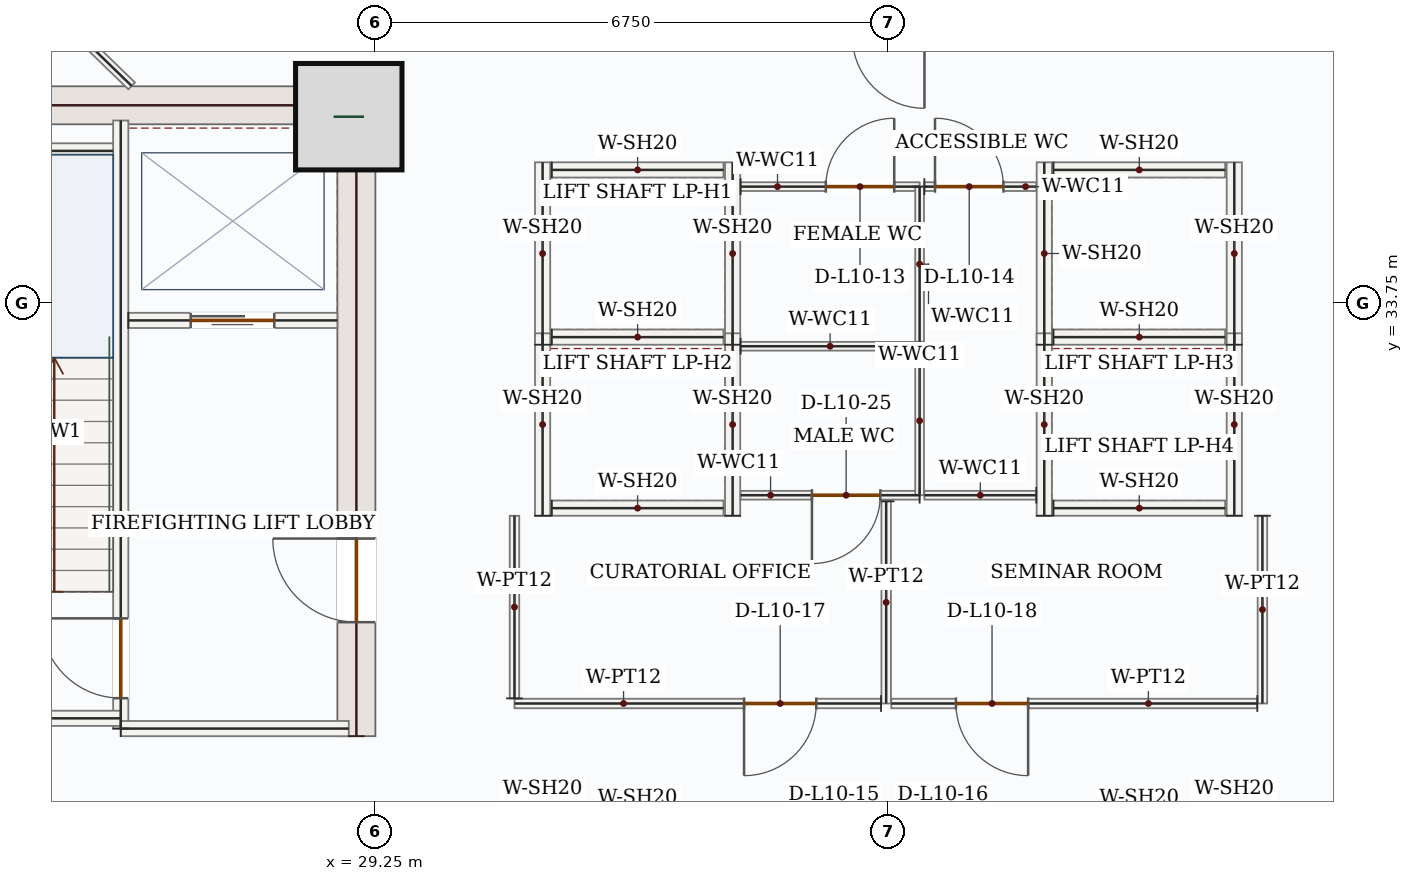
"""IFC4 building model, lengths in metres.
Left out: names, types, materials, properties, quantities, classifications, styles, units other than length and angle.
Written with IfcOpenShell. Run it as: python <this file> out.ifc"""

import sys

from ifc_helpers import new_model, si_unit, direction, frame, frame_2d, origin, origin_2d, place, context, subcontext, project, spatial, rectangle, extrude, source, transform, mapped, element, fill, save


model = new_model("IFC4")
c1 = context("Model", 3, precision=1e-05, world=origin(), true_north=direction((0.0, 1.0)))
c2 = subcontext(c1, "Body", "Model", "MODEL_VIEW")
j1 = project(units=[si_unit("LENGTHUNIT", "METRE"), si_unit("PLANEANGLEUNIT", "RADIAN")], contexts=[c1])
p1 = place(None, origin())
s1 = spatial("IfcSite", under=j1, at=p1, CompositionType="ELEMENT")
p2 = place(p1, origin())
s2 = spatial("IfcBuilding", under=s1, at=p2, CompositionType="ELEMENT")
p3 = place(p2, frame((0.0, 0.0, 50.1)))
s3 = spatial("IfcBuildingStorey", under=s2, at=p3, CompositionType="ELEMENT", Elevation=50.1)
p4 = place(p3, frame((29.0, 28.05, 0.0), z_axis=(0.0, 0.0, 1.0), x_axis=(0.0, 1.0, 0.0)))
e1 = element("IfcWall", 1, at=p4, inside=s3, PredefinedType="SHEAR", context=c2, shape_type="SweptSolid", body=[
    extrude(rectangle(XDim=8.55, YDim=0.5, at=frame_2d((4.275, 0.0))), origin(), (0.0, 0.0, 1.0), 3.95),
])
p5 = place(p4, frame((1.5, 0.0, 0.0)))
e2 = element("IfcOpeningElement", 2, at=p5, cuts=e1, PredefinedType="OPENING", context=c2, shape_type="SweptSolid", body=[
    extrude(rectangle(XDim=1.1, YDim=2.2, at=frame_2d((0.55, 1.1))), frame((0.0, 0.26, 0.0), z_axis=(0.0, -1.0, 0.0), x_axis=(1.0, 0.0, 0.0)), (0.0, 0.0, 1.0), 0.52),
])
m1 = source(origin(), c2, "Body", "SweptSolid", [
    extrude(rectangle(XDim=7.0, YDim=0.5, at=frame_2d((3.5, 0.0))), origin(), (0.0, 0.0, 1.0), 3.95),
])
p6 = place(p3, frame((21.75, 36.35, 0.0), z_axis=(0.0, 0.0, 1.0), x_axis=(1.0, 0.0, 0.0)))
e3 = element("IfcWall", 3, at=p6, inside=s3, PredefinedType="SHEAR", context=c2, shape_type="MappedRepresentation", body=[
    mapped(m1, transform((0.0, 0.0, 0.0), x_axis=(1.0, 0.0, 0.0), y_axis=(0.0, 1.0, 0.0), z_axis=(0.0, 0.0, 1.0), scale=1.0)),
])
m2 = source(origin(), c2, "Body", "SweptSolid", [
    extrude(rectangle(XDim=1.4, YDim=1.4, at=origin_2d()), origin(), (0.0, 0.0, 1.0), 4.2),
])
p7 = place(p3, frame((28.9, 36.2, 0.0), z_axis=(0.0, 0.0, 1.0), x_axis=(1.0, 0.0, 0.0)))
e4 = element("IfcColumn", 4, at=p7, inside=s3, PredefinedType="COLUMN", context=c2, shape_type="MappedRepresentation", body=[
    mapped(m2, transform((0.0, 0.0, 0.0), x_axis=(1.0, 0.0, 0.0), y_axis=(0.0, 1.0, 0.0), z_axis=(0.0, 0.0, 1.0), scale=1.0)),
])
p8 = place(p3, frame((25.9, 28.15, 0.0), z_axis=(0.0, 0.0, 1.0), x_axis=(0.0, 1.0, 0.0)))
e5 = element("IfcWall", 5, at=p8, inside=s3, PredefinedType="SOLIDWALL", context=c2, shape_type="SweptSolid", body=[
    extrude(rectangle(XDim=8.0, YDim=0.2, at=frame_2d((4.0, 0.0))), origin(), (0.0, 0.0, 1.0), 3.95),
])
p9 = place(p8, frame((0.4, 0.0, 0.0)))
e6 = element("IfcOpeningElement", 6, at=p9, cuts=e5, PredefinedType="OPENING", context=c2, shape_type="SweptSolid", body=[
    extrude(rectangle(XDim=1.05, YDim=2.15, at=frame_2d((0.525, 1.075))), frame((0.0, 0.11, 0.0), z_axis=(0.0, -1.0, 0.0), x_axis=(1.0, 0.0, 0.0)), (0.0, 0.0, 1.0), 0.22),
])
m3 = source(origin(), c2, "Body", "SweptSolid", [
    extrude(rectangle(XDim=4.25, YDim=0.2, at=frame_2d((2.125, 0.0))), origin(), (0.0, 0.0, 1.0), 3.95),
])
p10 = place(p3, frame((21.65, 28.285, 0.0), z_axis=(0.0, 0.0, 1.0), x_axis=(1.0, 0.0, 0.0)))
e7 = element("IfcWall", 7, at=p10, inside=s3, PredefinedType="SOLIDWALL", context=c2, shape_type="MappedRepresentation", body=[
    mapped(m3, transform((0.0, 0.0, 0.0), x_axis=(1.0, 0.0, 0.0), y_axis=(0.0, 1.0, 0.0), z_axis=(0.0, 0.0, 1.0), scale=1.0)),
])
m4 = source(origin(), c2, "Body", "SweptSolid", [
    extrude(rectangle(XDim=3.0, YDim=0.2, at=frame_2d((1.5, 0.0))), origin(), (0.0, 0.0, 1.0), 3.95),
])
p11 = place(p3, frame((25.9, 28.15, 0.0), z_axis=(0.0, 0.0, 1.0), x_axis=(1.0, 0.0, 0.0)))
e8 = element("IfcWall", 8, at=p11, inside=s3, PredefinedType="SOLIDWALL", context=c2, shape_type="MappedRepresentation", body=[
    mapped(m4, transform((0.0, 0.0, 0.0), x_axis=(1.0, 0.0, 0.0), y_axis=(0.0, 1.0, 0.0), z_axis=(0.0, 0.0, 1.0), scale=1.0)),
])
m5 = source(origin(), c2, "Body", "SweptSolid", [
    extrude(rectangle(XDim=3.25, YDim=0.2, at=frame_2d((1.625, 0.0))), origin(), (0.0, 0.0, 1.0), 3.95),
])
p12 = place(p3, frame((22.55, 35.75, 0.0), z_axis=(0.0, 0.0, 1.0), x_axis=(1.0, 0.0, 0.0)))
e9 = element("IfcWall", 9, at=p12, inside=s3, PredefinedType="SOLIDWALL", context=c2, shape_type="MappedRepresentation", body=[
    mapped(m5, transform((0.0, 0.0, 0.0), x_axis=(1.0, 0.0, 0.0), y_axis=(0.0, 1.0, 0.0), z_axis=(0.0, 0.0, 1.0), scale=1.0)),
])
p13 = place(p3, frame((26.0, 33.52, 0.0), z_axis=(0.0, 0.0, 1.0), x_axis=(1.0, 0.0, 0.0)))
e10 = element("IfcWall", 10, at=p13, inside=s3, PredefinedType="SOLIDWALL", context=c2, shape_type="SweptSolid", body=[
    extrude(rectangle(XDim=2.75, YDim=0.2, at=frame_2d((1.375, 0.0))), origin(), (0.0, 0.0, 1.0), 3.95),
])
p14 = place(p13, frame((0.82, 0.0, 0.0)))
e11 = element("IfcOpeningElement", 11, at=p14, cuts=e10, PredefinedType="OPENING", context=c2, shape_type="SweptSolid", body=[
    extrude(rectangle(XDim=1.1, YDim=2.15, at=frame_2d((0.55, 1.075))), frame((0.0, 0.11, 0.0), z_axis=(0.0, -1.0, 0.0), x_axis=(1.0, 0.0, 0.0)), (0.0, 0.0, 1.0), 0.22),
])
m6 = source(origin(), c2, "Body", "SweptSolid", [
    extrude(rectangle(XDim=2.4, YDim=0.2, at=frame_2d((1.2, 0.0))), origin(), (0.0, 0.0, 1.0), 3.95),
])
for number, where, z_axis, x_axis in (
    (12, (31.45, 33.2, 0.0), (0.0, 0.0, 1.0), (0.0, 1.0, 0.0)),
    (13, (33.95, 33.2, 0.0), (0.0, 0.0, 1.0), (0.0, 1.0, 0.0)),
):
    element("IfcWall", number, at=place(p3, frame(where, z_axis=z_axis, x_axis=x_axis)), inside=s3, PredefinedType="SOLIDWALL", context=c2, shape_type="MappedRepresentation", body=[
        mapped(m6, transform((0.0, 0.0, 0.0), x_axis=(1.0, 0.0, 0.0), y_axis=(0.0, 1.0, 0.0), z_axis=(0.0, 0.0, 1.0), scale=1.0)),
    ])
m7 = source(origin(), c2, "Body", "SweptSolid", [
    extrude(rectangle(XDim=2.26, YDim=0.2, at=frame_2d((1.13, 0.0))), origin(), (0.0, 0.0, 1.0), 3.95),
])
for number, where, z_axis, x_axis in (
    (14, (31.57, 33.3, 0.0), (0.0, 0.0, 1.0), (1.0, 0.0, 0.0)),
    (15, (31.57, 35.5, 0.0), (0.0, 0.0, 1.0), (1.0, 0.0, 0.0)),
):
    element("IfcWall", number, at=place(p3, frame(where, z_axis=z_axis, x_axis=x_axis)), inside=s3, PredefinedType="SOLIDWALL", context=c2, shape_type="MappedRepresentation", body=[
        mapped(m7, transform((0.0, 0.0, 0.0), x_axis=(1.0, 0.0, 0.0), y_axis=(0.0, 1.0, 0.0), z_axis=(0.0, 0.0, 1.0), scale=1.0)),
    ])
for number, where, z_axis, x_axis in (
    (16, (31.45, 30.95, 0.0), (0.0, 0.0, 1.0), (0.0, 1.0, 0.0)),
    (17, (33.95, 30.95, 0.0), (0.0, 0.0, 1.0), (0.0, 1.0, 0.0)),
):
    element("IfcWall", number, at=place(p3, frame(where, z_axis=z_axis, x_axis=x_axis)), inside=s3, PredefinedType="SOLIDWALL", context=c2, shape_type="MappedRepresentation", body=[
        mapped(m6, transform((0.0, 0.0, 0.0), x_axis=(1.0, 0.0, 0.0), y_axis=(0.0, 1.0, 0.0), z_axis=(0.0, 0.0, 1.0), scale=1.0)),
    ])
p15 = place(p3, frame((31.57, 31.05, 0.0), z_axis=(0.0, 0.0, 1.0), x_axis=(1.0, 0.0, 0.0)))
e18 = element("IfcWall", 18, at=p15, inside=s3, PredefinedType="SOLIDWALL", context=c2, shape_type="MappedRepresentation", body=[
    mapped(m7, transform((0.0, 0.0, 0.0), x_axis=(1.0, 0.0, 0.0), y_axis=(0.0, 1.0, 0.0), z_axis=(0.0, 0.0, 1.0), scale=1.0)),
])
for number, where, z_axis, x_axis in (
    (19, (38.05, 33.2, 0.0), (0.0, 0.0, 1.0), (0.0, 1.0, 0.0)),
    (20, (40.55, 33.2, 0.0), (0.0, 0.0, 1.0), (0.0, 1.0, 0.0)),
):
    element("IfcWall", number, at=place(p3, frame(where, z_axis=z_axis, x_axis=x_axis)), inside=s3, PredefinedType="SOLIDWALL", context=c2, shape_type="MappedRepresentation", body=[
        mapped(m6, transform((0.0, 0.0, 0.0), x_axis=(1.0, 0.0, 0.0), y_axis=(0.0, 1.0, 0.0), z_axis=(0.0, 0.0, 1.0), scale=1.0)),
    ])
for number, where, z_axis, x_axis in (
    (21, (38.17, 33.3, 0.0), (0.0, 0.0, 1.0), (1.0, 0.0, 0.0)),
    (22, (38.17, 35.5, 0.0), (0.0, 0.0, 1.0), (1.0, 0.0, 0.0)),
):
    element("IfcWall", number, at=place(p3, frame(where, z_axis=z_axis, x_axis=x_axis)), inside=s3, PredefinedType="SOLIDWALL", context=c2, shape_type="MappedRepresentation", body=[
        mapped(m7, transform((0.0, 0.0, 0.0), x_axis=(1.0, 0.0, 0.0), y_axis=(0.0, 1.0, 0.0), z_axis=(0.0, 0.0, 1.0), scale=1.0)),
    ])
for number, where, z_axis, x_axis in (
    (23, (38.05, 30.95, 0.0), (0.0, 0.0, 1.0), (0.0, 1.0, 0.0)),
    (24, (40.55, 30.95, 0.0), (0.0, 0.0, 1.0), (0.0, 1.0, 0.0)),
):
    element("IfcWall", number, at=place(p3, frame(where, z_axis=z_axis, x_axis=x_axis)), inside=s3, PredefinedType="SOLIDWALL", context=c2, shape_type="MappedRepresentation", body=[
        mapped(m6, transform((0.0, 0.0, 0.0), x_axis=(1.0, 0.0, 0.0), y_axis=(0.0, 1.0, 0.0), z_axis=(0.0, 0.0, 1.0), scale=1.0)),
    ])
p16 = place(p3, frame((38.17, 31.05, 0.0), z_axis=(0.0, 0.0, 1.0), x_axis=(1.0, 0.0, 0.0)))
e25 = element("IfcWall", 25, at=p16, inside=s3, PredefinedType="SOLIDWALL", context=c2, shape_type="MappedRepresentation", body=[
    mapped(m7, transform((0.0, 0.0, 0.0), x_axis=(1.0, 0.0, 0.0), y_axis=(0.0, 1.0, 0.0), z_axis=(0.0, 0.0, 1.0), scale=1.0)),
])
p17 = place(p3, frame((36.41, 31.22, 0.0), z_axis=(0.0, 0.0, 1.0), x_axis=(-1.0, 0.0, 0.0)))
e26 = element("IfcWall", 26, at=p17, inside=s3, PredefinedType="PARTITIONING", context=c2, shape_type="SweptSolid", body=[
    extrude(rectangle(XDim=2.355, YDim=0.115, at=frame_2d((1.177, 0.0))), origin(), (0.0, 0.0, 1.0), 3.95),
])
p18 = place(p17, frame((0.517, 0.0, 0.0)))
e27 = element("IfcOpeningElement", 27, at=p18, cuts=e26, PredefinedType="OPENING", context=c2, shape_type="SweptSolid", body=[
    extrude(rectangle(XDim=0.9, YDim=2.1, at=frame_2d((0.45, 1.05))), frame((0.0, 0.067, 0.0), z_axis=(0.0, -1.0, 0.0), x_axis=(1.0, 0.0, 0.0)), (0.0, 0.0, 1.0), 0.135),
])
m8 = source(origin(), c2, "Body", "SweptSolid", [
    extrude(rectangle(XDim=2.355, YDim=0.115, at=frame_2d((1.177, 0.0))), origin(), (0.0, 0.0, 1.0), 3.95),
])
p19 = place(p3, frame((34.055, 33.18, 0.0), z_axis=(0.0, 0.0, 1.0), x_axis=(1.0, 0.0, 0.0)))
e28 = element("IfcWall", 28, at=p19, inside=s3, PredefinedType="PARTITIONING", context=c2, shape_type="MappedRepresentation", body=[
    mapped(m8, transform((0.0, 0.0, 0.0), x_axis=(1.0, 0.0, 0.0), y_axis=(0.0, 1.0, 0.0), z_axis=(0.0, 0.0, 1.0), scale=1.0)),
])
m9 = source(origin(), c2, "Body", "SweptSolid", [
    extrude(rectangle(XDim=1.96, YDim=0.115, at=frame_2d((0.98, 0.0))), origin(), (0.0, 0.0, 1.0), 3.95),
])
p20 = place(p3, frame((36.41, 33.18, 0.0), z_axis=(0.0, 0.0, 1.0), x_axis=(0.0, -1.0, 0.0)))
e29 = element("IfcWall", 29, at=p20, inside=s3, PredefinedType="PARTITIONING", context=c2, shape_type="MappedRepresentation", body=[
    mapped(m9, transform((0.0, 0.0, 0.0), x_axis=(1.0, 0.0, 0.0), y_axis=(0.0, 1.0, 0.0), z_axis=(0.0, 0.0, 1.0), scale=1.0)),
])
p21 = place(p3, frame((34.055, 35.28, 0.0), z_axis=(0.0, 0.0, 1.0), x_axis=(1.0, 0.0, 0.0)))
e30 = element("IfcWall", 30, at=p21, inside=s3, PredefinedType="PARTITIONING", context=c2, shape_type="SweptSolid", body=[
    extrude(rectangle(XDim=2.355, YDim=0.115, at=frame_2d((1.177, 0.0))), origin(), (0.0, 0.0, 1.0), 3.95),
])
p22 = place(p21, frame((1.121, 0.0, 0.0)))
e31 = element("IfcOpeningElement", 31, at=p22, cuts=e30, PredefinedType="OPENING", context=c2, shape_type="SweptSolid", body=[
    extrude(rectangle(XDim=0.9, YDim=2.1, at=frame_2d((0.45, 1.05))), frame((0.0, 0.067, 0.0), z_axis=(0.0, -1.0, 0.0), x_axis=(1.0, 0.0, 0.0)), (0.0, 0.0, 1.0), 0.135),
])
m10 = source(origin(), c2, "Body", "SweptSolid", [
    extrude(rectangle(XDim=2.04, YDim=0.115, at=frame_2d((1.02, 0.0))), origin(), (0.0, 0.0, 1.0), 3.95),
])
p23 = place(p3, frame((36.41, 35.28, 0.0), z_axis=(0.0, 0.0, 1.0), x_axis=(0.0, -1.0, 0.0)))
e32 = element("IfcWall", 32, at=p23, inside=s3, PredefinedType="PARTITIONING", context=c2, shape_type="MappedRepresentation", body=[
    mapped(m10, transform((0.0, 0.0, 0.0), x_axis=(1.0, 0.0, 0.0), y_axis=(0.0, 1.0, 0.0), z_axis=(0.0, 0.0, 1.0), scale=1.0)),
])
m11 = source(origin(), c2, "Body", "SweptSolid", [
    extrude(rectangle(XDim=1.473, YDim=0.115, at=frame_2d((0.736, 0.0))), origin(), (0.0, 0.0, 1.0), 3.95),
])
p24 = place(p3, frame((37.945, 31.22, 0.0), z_axis=(0.0, 0.0, 1.0), x_axis=(-1.0, 0.0, 0.0)))
e33 = element("IfcWall", 33, at=p24, inside=s3, PredefinedType="PARTITIONING", context=c2, shape_type="MappedRepresentation", body=[
    mapped(m11, transform((0.0, 0.0, 0.0), x_axis=(1.0, 0.0, 0.0), y_axis=(0.0, 1.0, 0.0), z_axis=(0.0, 0.0, 1.0), scale=1.0)),
])
p25 = place(p3, frame((36.472, 35.28, 0.0), z_axis=(0.0, 0.0, 1.0), x_axis=(1.0, 0.0, 0.0)))
e34 = element("IfcWall", 34, at=p25, inside=s3, PredefinedType="PARTITIONING", context=c2, shape_type="SweptSolid", body=[
    extrude(rectangle(XDim=1.473, YDim=0.115, at=frame_2d((0.736, 0.0))), origin(), (0.0, 0.0, 1.0), 3.95),
])
p26 = place(p25, frame((0.14, 0.0, 0.0)))
e35 = element("IfcOpeningElement", 35, at=p26, cuts=e34, PredefinedType="OPENING", context=c2, shape_type="SweptSolid", body=[
    extrude(rectangle(XDim=0.9, YDim=2.1, at=frame_2d((0.45, 1.05))), frame((0.0, 0.067, 0.0), z_axis=(0.0, -1.0, 0.0), x_axis=(1.0, 0.0, 0.0)), (0.0, 0.0, 1.0), 0.135),
])
m12 = source(origin(), c2, "Body", "SweptSolid", [
    extrude(rectangle(XDim=2.66, YDim=0.125, at=frame_2d((1.33, 0.0))), origin(), (0.0, 0.0, 1.0), 3.95),
])
p27 = place(p3, frame((35.97, 31.14, 0.0), z_axis=(0.0, 0.0, 1.0), x_axis=(0.0, -1.0, 0.0)))
e36 = element("IfcWall", 36, at=p27, inside=s3, PredefinedType="PARTITIONING", context=c2, shape_type="MappedRepresentation", body=[
    mapped(m12, transform((0.0, 0.0, 0.0), x_axis=(1.0, 0.0, 0.0), y_axis=(0.0, 1.0, 0.0), z_axis=(0.0, 0.0, 1.0), scale=1.0)),
])
p28 = place(p3, frame((35.903, 28.48, 0.0), z_axis=(0.0, 0.0, 1.0), x_axis=(-1.0, 0.0, 0.0)))
e37 = element("IfcWall", 37, at=p28, inside=s3, PredefinedType="PARTITIONING", context=c2, shape_type="SweptSolid", body=[
    extrude(rectangle(XDim=4.823, YDim=0.125, at=frame_2d((2.411, 0.0))), origin(), (0.0, 0.0, 1.0), 3.95),
])
p29 = place(p28, frame((0.852, 0.0, 0.0)))
e38 = element("IfcOpeningElement", 38, at=p29, cuts=e37, PredefinedType="OPENING", context=c2, shape_type="SweptSolid", body=[
    extrude(rectangle(XDim=0.95, YDim=2.15, at=frame_2d((0.475, 1.075))), frame((0.0, 0.073, 0.0), z_axis=(0.0, -1.0, 0.0), x_axis=(1.0, 0.0, 0.0)), (0.0, 0.0, 1.0), 0.145),
])
m13 = source(origin(), c2, "Body", "SweptSolid", [
    extrude(rectangle(XDim=2.402, YDim=0.125, at=frame_2d((1.201, 0.0))), origin(), (0.0, 0.0, 1.0), 3.95),
])
p30 = place(p3, frame((31.08, 28.548, 0.0), z_axis=(0.0, 0.0, 1.0), x_axis=(0.0, 1.0, 0.0)))
e39 = element("IfcWall", 39, at=p30, inside=s3, PredefinedType="PARTITIONING", context=c2, shape_type="MappedRepresentation", body=[
    mapped(m13, transform((0.0, 0.0, 0.0), x_axis=(1.0, 0.0, 0.0), y_axis=(0.0, 1.0, 0.0), z_axis=(0.0, 0.0, 1.0), scale=1.0)),
])
m14 = source(origin(), c2, "Body", "SweptSolid", [
    extrude(rectangle(XDim=2.47, YDim=0.125, at=frame_2d((1.235, 0.0))), origin(), (0.0, 0.0, 1.0), 3.95),
])
p31 = place(p3, frame((40.92, 30.95, 0.0), z_axis=(0.0, 0.0, 1.0), x_axis=(0.0, -1.0, 0.0)))
e40 = element("IfcWall", 40, at=p31, inside=s3, PredefinedType="PARTITIONING", context=c2, shape_type="MappedRepresentation", body=[
    mapped(m14, transform((0.0, 0.0, 0.0), x_axis=(1.0, 0.0, 0.0), y_axis=(0.0, 1.0, 0.0), z_axis=(0.0, 0.0, 1.0), scale=1.0)),
])
p32 = place(p3, frame((40.853, 28.48, 0.0), z_axis=(0.0, 0.0, 1.0), x_axis=(-1.0, 0.0, 0.0)))
e41 = element("IfcWall", 41, at=p32, inside=s3, PredefinedType="PARTITIONING", context=c2, shape_type="SweptSolid", body=[
    extrude(rectangle(XDim=4.815, YDim=0.125, at=frame_2d((2.407, 0.0))), origin(), (0.0, 0.0, 1.0), 3.95),
])
p33 = place(p32, frame((3.015, 0.0, 0.0)))
e42 = element("IfcOpeningElement", 42, at=p33, cuts=e41, PredefinedType="OPENING", context=c2, shape_type="SweptSolid", body=[
    extrude(rectangle(XDim=0.95, YDim=2.15, at=frame_2d((0.475, 1.075))), frame((0.0, 0.073, 0.0), z_axis=(0.0, -1.0, 0.0), x_axis=(1.0, 0.0, 0.0)), (0.0, 0.0, 1.0), 0.145),
])
m15 = source(origin(), c2, "Body", "SweptSolid", [
    extrude(rectangle(XDim=1.771, YDim=0.125, at=frame_2d((0.885, 0.0))), origin(), (0.0, 0.0, 1.0), 3.95),
])
p34 = place(p3, frame((24.772, 37.838, 0.0), z_axis=(0.0, 0.0, 1.0), x_axis=(0.717777212316, -0.696272844135, 0.0)))
e43 = element("IfcWall", 43, at=p34, inside=s3, PredefinedType="PARTITIONING", context=c2, shape_type="MappedRepresentation", body=[
    mapped(m15, transform((0.0, 0.0, 0.0), x_axis=(1.0, 0.0, 0.0), y_axis=(0.0, 1.0, 0.0), z_axis=(0.0, 0.0, 1.0), scale=1.0)),
])
m16 = source(origin(), c2, "Body", "SweptSolid", [
    extrude(rectangle(XDim=1.05, YDim=2.15, at=frame_2d((0.525, 1.075))), frame((0.0, 0.025, 0.0), z_axis=(0.0, -1.0, 0.0), x_axis=(1.0, 0.0, 0.0)), (0.0, 0.0, 1.0), 0.05),
])
p35 = place(p9, origin())
e44 = element("IfcDoor", 44, at=p35, inside=s3, OperationType="SINGLE_SWING_RIGHT", PredefinedType="DOOR", context=c2, shape_type="MappedRepresentation", body=[
    mapped(m16, transform((0.0, 0.0, 0.0), x_axis=(1.0, 0.0, 0.0), y_axis=(0.0, 1.0, 0.0), z_axis=(0.0, 0.0, 1.0), scale=1.0)),
])
fill(e6, e44)
m17 = source(origin(), c2, "Body", "SweptSolid", [
    extrude(rectangle(XDim=1.1, YDim=2.15, at=frame_2d((0.55, 1.075))), frame((0.0, 0.025, 0.0), z_axis=(0.0, -1.0, 0.0), x_axis=(1.0, 0.0, 0.0)), (0.0, 0.0, 1.0), 0.05),
])
p36 = place(p14, origin())
e45 = element("IfcDoor", 45, at=p36, inside=s3, OperationType="DOUBLE_DOOR_SLIDING", PredefinedType="DOOR", context=c2, shape_type="MappedRepresentation", body=[
    mapped(m17, transform((0.0, 0.0, 0.0), x_axis=(1.0, 0.0, 0.0), y_axis=(0.0, 1.0, 0.0), z_axis=(0.0, 0.0, 1.0), scale=1.0)),
])
fill(e11, e45)
m18 = source(origin(), c2, "Body", "SweptSolid", [
    extrude(rectangle(XDim=1.1, YDim=2.2, at=frame_2d((0.55, 1.1))), frame((0.0, 0.025, 0.0), z_axis=(0.0, -1.0, 0.0), x_axis=(1.0, 0.0, 0.0)), (0.0, 0.0, 1.0), 0.05),
])
p37 = place(p5, origin())
e46 = element("IfcDoor", 46, at=p37, inside=s3, OperationType="SINGLE_SWING_RIGHT", PredefinedType="DOOR", context=c2, shape_type="MappedRepresentation", body=[
    mapped(m18, transform((0.0, 0.0, 0.0), x_axis=(1.0, 0.0, 0.0), y_axis=(0.0, 1.0, 0.0), z_axis=(0.0, 0.0, 1.0), scale=1.0)),
])
fill(e2, e46)
m19 = source(origin(), c2, "Body", "SweptSolid", [
    extrude(rectangle(XDim=0.9, YDim=2.1, at=frame_2d((0.45, 1.05))), frame((0.0, 0.025, 0.0), z_axis=(0.0, -1.0, 0.0), x_axis=(1.0, 0.0, 0.0)), (0.0, 0.0, 1.0), 0.05),
])
p38 = place(p22, origin())
e47 = element("IfcDoor", 47, at=p38, inside=s3, OperationType="SINGLE_SWING_RIGHT", PredefinedType="DOOR", context=c2, shape_type="MappedRepresentation", body=[
    mapped(m19, transform((0.0, 0.0, 0.0), x_axis=(1.0, 0.0, 0.0), y_axis=(0.0, 1.0, 0.0), z_axis=(0.0, 0.0, 1.0), scale=1.0)),
])
fill(e31, e47)
p39 = place(p26, origin())
e48 = element("IfcDoor", 48, at=p39, inside=s3, OperationType="SINGLE_SWING_LEFT", PredefinedType="DOOR", context=c2, shape_type="MappedRepresentation", body=[
    mapped(m19, transform((0.0, 0.0, 0.0), x_axis=(1.0, 0.0, 0.0), y_axis=(0.0, 1.0, 0.0), z_axis=(0.0, 0.0, 1.0), scale=1.0)),
])
fill(e35, e48)
m20 = source(origin(), c2, "Body", "SweptSolid", [
    extrude(rectangle(XDim=0.95, YDim=2.15, at=frame_2d((0.475, 1.075))), frame((0.0, 0.025, 0.0), z_axis=(0.0, -1.0, 0.0), x_axis=(1.0, 0.0, 0.0)), (0.0, 0.0, 1.0), 0.05),
])
p40 = place(p29, origin())
e49 = element("IfcDoor", 49, at=p40, inside=s3, OperationType="SINGLE_SWING_RIGHT", PredefinedType="DOOR", context=c2, shape_type="MappedRepresentation", body=[
    mapped(m20, transform((0.0, 0.0, 0.0), x_axis=(1.0, 0.0, 0.0), y_axis=(0.0, 1.0, 0.0), z_axis=(0.0, 0.0, 1.0), scale=1.0)),
])
fill(e38, e49)
p41 = place(p33, origin())
e50 = element("IfcDoor", 50, at=p41, inside=s3, OperationType="SINGLE_SWING_LEFT", PredefinedType="DOOR", context=c2, shape_type="MappedRepresentation", body=[
    mapped(m20, transform((0.0, 0.0, 0.0), x_axis=(1.0, 0.0, 0.0), y_axis=(0.0, 1.0, 0.0), z_axis=(0.0, 0.0, 1.0), scale=1.0)),
])
fill(e42, e50)
p42 = place(p18, origin())
e51 = element("IfcDoor", 51, at=p42, inside=s3, OperationType="SINGLE_SWING_RIGHT", PredefinedType="DOOR", context=c2, shape_type="MappedRepresentation", body=[
    mapped(m19, transform((0.0, 0.0, 0.0), x_axis=(1.0, 0.0, 0.0), y_axis=(0.0, 1.0, 0.0), z_axis=(0.0, 0.0, 1.0), scale=1.0)),
])
fill(e27, e51)
save(model, sys.argv[1])
